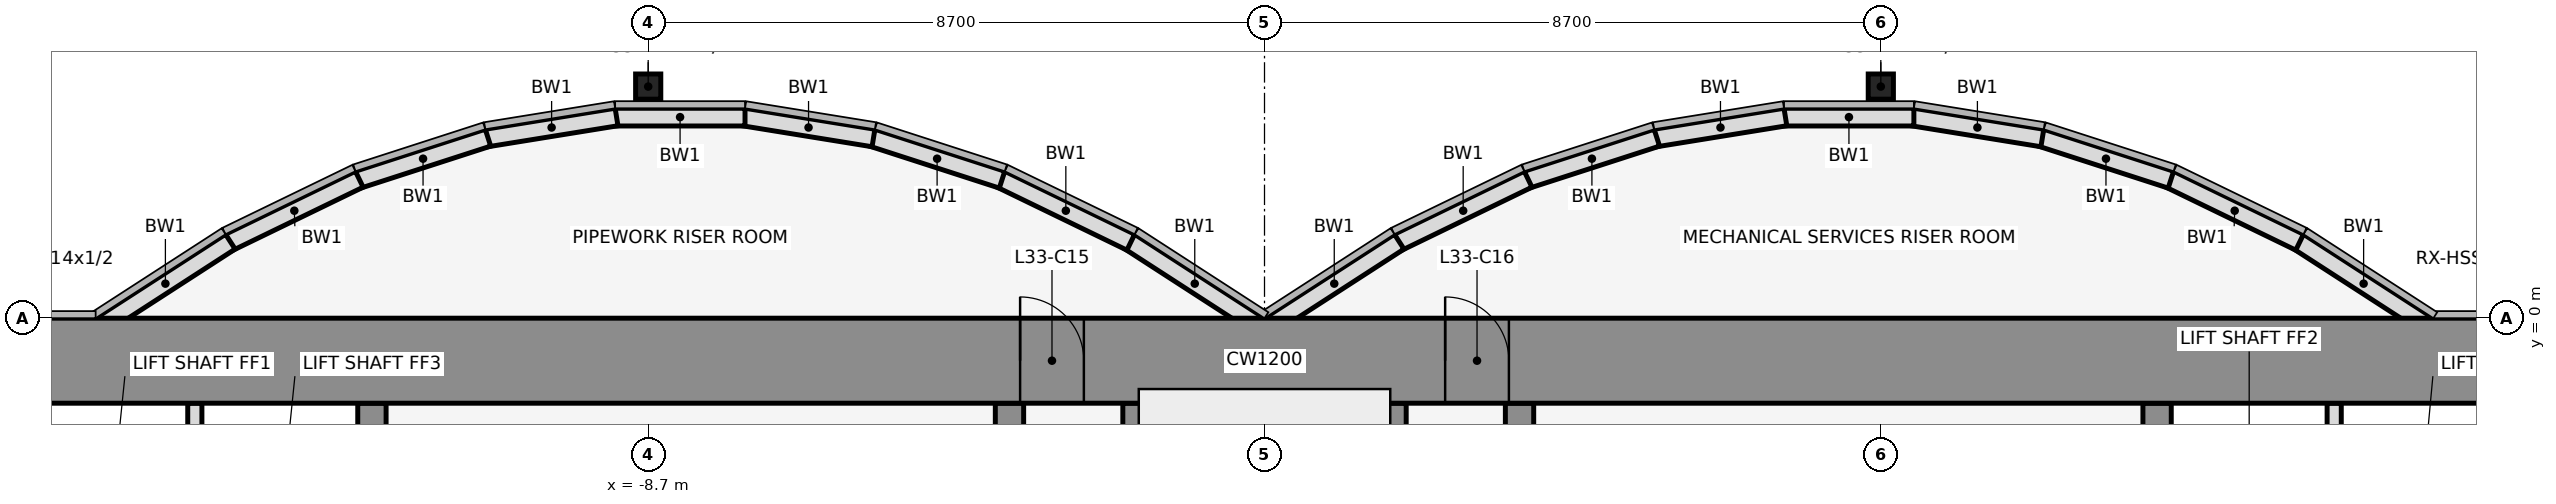
"""IFC4 building model, lengths in metres.
Left out: names, types, materials, properties, quantities, classifications, styles, units other than length and angle.
Written with IfcOpenShell. Run it as: python <this file> out.ifc"""

import sys

from ifc_helpers import new_model, si_unit, direction, frame, frame_2d, origin, origin_2d, place, context, subcontext, project, spatial, rectangle, hollow_rectangle, extrude, element, fill, save


model = new_model("IFC4")
c1 = context("Model", 3, precision=1e-05, world=origin(), true_north=direction((0.0, 1.0)))
c2 = subcontext(c1, "Body", "Model", "MODEL_VIEW")
j1 = project(units=[si_unit("LENGTHUNIT", "METRE"), si_unit("PLANEANGLEUNIT", "RADIAN")], contexts=[c1])
p1 = place(None, origin())
s1 = spatial("IfcSite", under=j1, at=p1, CompositionType="ELEMENT")
p2 = place(p1, origin())
s2 = spatial("IfcBuilding", under=s1, at=p2, CompositionType="ELEMENT")
p3 = place(p2, frame((0.0, 0.0, 152.7)))
s3 = spatial("IfcBuildingStorey", under=s2, at=p3, CompositionType="ELEMENT", Elevation=152.7)
for number, where, z_axis, x_axis in (
    (1, (-8.7, 3.269, 0.0), (0.0, 0.0, 1.0), (1.0, 0.0, 0.0)),
    (2, (8.7, 3.269, 0.0), (0.0, 0.0, 1.0), (1.0, 0.0, 0.0)),
):
    element("IfcColumn", number, at=place(p3, frame(where, z_axis=z_axis, x_axis=x_axis)), inside=s3, PredefinedType="COLUMN", context=c2, shape_type="SweptSolid", body=[
        extrude(hollow_rectangle(XDim=0.356, YDim=0.356, WallThickness=0.012, at=origin_2d()), origin(), (0.0, 0.0, 1.0), 4.1),
    ])
p4 = place(p3, frame((16.432, -0.105, 0.0), z_axis=(0.0, 0.0, 1.0), x_axis=(-0.83981312244, 0.542875602121, 0.0)))
e3 = element("IfcWall", 3, at=p4, inside=s3, PredefinedType="STANDARD", context=c2, shape_type="SweptSolid", body=[
    extrude(rectangle(XDim=2.183, YDim=0.25, at=frame_2d((1.091, 0.0))), origin(), (0.0, 0.0, 1.0), 3.95),
])
p5 = place(p3, frame((14.612, 1.073, 0.0), z_axis=(0.0, 0.0, 1.0), x_axis=(-0.89982408427, 0.436252928206, 0.0)))
e4 = element("IfcWall", 4, at=p5, inside=s3, PredefinedType="STANDARD", context=c2, shape_type="SweptSolid", body=[
    extrude(rectangle(XDim=2.038, YDim=0.25, at=frame_2d((1.019, 0.0))), origin(), (0.0, 0.0, 1.0), 3.95),
])
p6 = place(p3, frame((12.795, 1.955, 0.0), z_axis=(0.0, 0.0, 1.0), x_axis=(-0.951495806175, 0.307661714928, 0.0)))
e5 = element("IfcWall", 5, at=p6, inside=s3, PredefinedType="STANDARD", context=c2, shape_type="SweptSolid", body=[
    extrude(rectangle(XDim=1.927, YDim=0.25, at=frame_2d((0.963, 0.0))), origin(), (0.0, 0.0, 1.0), 3.95),
])
p7 = place(p3, frame((10.98, 2.543, 0.0), z_axis=(0.0, 0.0, 1.0), x_axis=(-0.987181718931, 0.159600293885, 0.0)))
e6 = element("IfcWall", 6, at=p7, inside=s3, PredefinedType="STANDARD", context=c2, shape_type="SweptSolid", body=[
    extrude(rectangle(XDim=1.857, YDim=0.25, at=frame_2d((0.929, 0.0))), origin(), (0.0, 0.0, 1.0), 3.95),
])
p8 = place(p3, frame((9.167, 2.838, 0.0), z_axis=(0.0, 0.0, 1.0), x_axis=(-1.0, 0.0, 0.0)))
e7 = element("IfcWall", 7, at=p8, inside=s3, PredefinedType="STANDARD", context=c2, shape_type="SweptSolid", body=[
    extrude(rectangle(XDim=1.833, YDim=0.25, at=frame_2d((0.917, 0.0))), origin(), (0.0, 0.0, 1.0), 3.95),
])
p9 = place(p3, frame((7.353, 2.84, 0.0), z_axis=(0.0, 0.0, 1.0), x_axis=(-0.987181718931, -0.159600293885, 0.0)))
e8 = element("IfcWall", 8, at=p9, inside=s3, PredefinedType="STANDARD", context=c2, shape_type="SweptSolid", body=[
    extrude(rectangle(XDim=1.857, YDim=0.25, at=frame_2d((0.929, 0.0))), origin(), (0.0, 0.0, 1.0), 3.95),
])
p10 = place(p3, frame((5.538, 2.548, 0.0), z_axis=(0.0, 0.0, 1.0), x_axis=(-0.951495806175, -0.307661714928, 0.0)))
e9 = element("IfcWall", 9, at=p10, inside=s3, PredefinedType="STANDARD", context=c2, shape_type="SweptSolid", body=[
    extrude(rectangle(XDim=1.927, YDim=0.25, at=frame_2d((0.963, 0.0))), origin(), (0.0, 0.0, 1.0), 3.95),
])
p11 = place(p3, frame((3.721, 1.962, 0.0), z_axis=(0.0, 0.0, 1.0), x_axis=(-0.89982408427, -0.436252928206, 0.0)))
e10 = element("IfcWall", 10, at=p11, inside=s3, PredefinedType="STANDARD", context=c2, shape_type="SweptSolid", body=[
    extrude(rectangle(XDim=2.038, YDim=0.25, at=frame_2d((1.019, 0.0))), origin(), (0.0, 0.0, 1.0), 3.95),
])
for number, where, z_axis, x_axis in (
    (11, (1.901, 1.08, 0.0), (0.0, 0.0, 1.0), (-0.84, -0.543, 0.0)),
    (12, (-0.068, -0.105, 0.0), (0.0, 0.0, 1.0), (-0.84, 0.543, 0.0)),
):
    element("IfcWall", number, at=place(p3, frame(where, z_axis=z_axis, x_axis=x_axis)), inside=s3, PredefinedType="STANDARD", context=c2, shape_type="SweptSolid", body=[
        extrude(rectangle(XDim=2.183, YDim=0.25, at=frame_2d((1.091, 0.0))), origin(), (0.0, 0.0, 1.0), 3.95),
    ])
p12 = place(p3, frame((-1.888, 1.073, 0.0), z_axis=(0.0, 0.0, 1.0), x_axis=(-0.89982408427, 0.436252928206, 0.0)))
e13 = element("IfcWall", 13, at=p12, inside=s3, PredefinedType="STANDARD", context=c2, shape_type="SweptSolid", body=[
    extrude(rectangle(XDim=2.038, YDim=0.25, at=frame_2d((1.019, 0.0))), origin(), (0.0, 0.0, 1.0), 3.95),
])
p13 = place(p3, frame((-3.705, 1.955, 0.0), z_axis=(0.0, 0.0, 1.0), x_axis=(-0.951495806175, 0.307661714928, 0.0)))
e14 = element("IfcWall", 14, at=p13, inside=s3, PredefinedType="STANDARD", context=c2, shape_type="SweptSolid", body=[
    extrude(rectangle(XDim=1.927, YDim=0.25, at=frame_2d((0.963, 0.0))), origin(), (0.0, 0.0, 1.0), 3.95),
])
p14 = place(p3, frame((-5.52, 2.543, 0.0), z_axis=(0.0, 0.0, 1.0), x_axis=(-0.987181718931, 0.159600293885, 0.0)))
e15 = element("IfcWall", 15, at=p14, inside=s3, PredefinedType="STANDARD", context=c2, shape_type="SweptSolid", body=[
    extrude(rectangle(XDim=1.857, YDim=0.25, at=frame_2d((0.929, 0.0))), origin(), (0.0, 0.0, 1.0), 3.95),
])
p15 = place(p3, frame((-7.333, 2.838, 0.0), z_axis=(0.0, 0.0, 1.0), x_axis=(-1.0, 0.0, 0.0)))
e16 = element("IfcWall", 16, at=p15, inside=s3, PredefinedType="STANDARD", context=c2, shape_type="SweptSolid", body=[
    extrude(rectangle(XDim=1.833, YDim=0.25, at=frame_2d((0.917, 0.0))), origin(), (0.0, 0.0, 1.0), 3.95),
])
p16 = place(p3, frame((-9.147, 2.84, 0.0), z_axis=(0.0, 0.0, 1.0), x_axis=(-0.987181718931, -0.159600293885, 0.0)))
e17 = element("IfcWall", 17, at=p16, inside=s3, PredefinedType="STANDARD", context=c2, shape_type="SweptSolid", body=[
    extrude(rectangle(XDim=1.857, YDim=0.25, at=frame_2d((0.929, 0.0))), origin(), (0.0, 0.0, 1.0), 3.95),
])
p17 = place(p3, frame((-10.962, 2.548, 0.0), z_axis=(0.0, 0.0, 1.0), x_axis=(-0.951495806175, -0.307661714928, 0.0)))
e18 = element("IfcWall", 18, at=p17, inside=s3, PredefinedType="STANDARD", context=c2, shape_type="SweptSolid", body=[
    extrude(rectangle(XDim=1.927, YDim=0.25, at=frame_2d((0.963, 0.0))), origin(), (0.0, 0.0, 1.0), 3.95),
])
p18 = place(p3, frame((-12.779, 1.962, 0.0), z_axis=(0.0, 0.0, 1.0), x_axis=(-0.89982408427, -0.436252928206, 0.0)))
e19 = element("IfcWall", 19, at=p18, inside=s3, PredefinedType="STANDARD", context=c2, shape_type="SweptSolid", body=[
    extrude(rectangle(XDim=2.038, YDim=0.25, at=frame_2d((1.019, 0.0))), origin(), (0.0, 0.0, 1.0), 3.95),
])
p19 = place(p3, frame((-14.599, 1.08, 0.0), z_axis=(0.0, 0.0, 1.0), x_axis=(-0.83981312244, -0.542875602121, 0.0)))
e20 = element("IfcWall", 20, at=p19, inside=s3, PredefinedType="STANDARD", context=c2, shape_type="SweptSolid", body=[
    extrude(rectangle(XDim=2.183, YDim=0.25, at=frame_2d((1.091, 0.0))), origin(), (0.0, 0.0, 1.0), 3.95),
])
p20 = place(p3, frame((-15.1, -4.6, 0.0), z_axis=(0.0, 0.0, 1.0), x_axis=(0.0, 1.0, 0.0)))
e21 = element("IfcWall", 21, at=p20, inside=s3, PredefinedType="PARTITIONING", context=c2, shape_type="SweptSolid", body=[
    extrude(rectangle(XDim=3.4, YDim=0.2, at=frame_2d((1.7, 0.0))), origin(), (0.0, 0.0, 1.0), 2.84),
])
p21 = place(p3, frame((-12.6, -11.8, 0.0), z_axis=(0.0, 0.0, 1.0), x_axis=(0.0, 1.0, 0.0)))
e22 = element("IfcWall", 22, at=p21, inside=s3, PredefinedType="SHEAR", context=c2, shape_type="SweptSolid", body=[
    extrude(rectangle(XDim=10.6, YDim=0.4, at=frame_2d((5.3, 0.0))), origin(), (0.0, 0.0, 1.0), 4.1),
])
p22 = place(p21, frame((4.75, 0.0, 0.0)))
e23 = element("IfcOpeningElement", 23, at=p22, cuts=e22, PredefinedType="OPENING", context=c2, shape_type="SweptSolid", body=[
    extrude(rectangle(XDim=1.1, YDim=2.1, at=frame_2d((0.55, 1.05))), frame((0.0, 0.212, 0.0), z_axis=(0.0, -1.0, 0.0), x_axis=(1.0, 0.0, 0.0)), (0.0, 0.0, 1.0), 0.424),
])
p23 = place(p3, frame((-3.6, -11.8, 0.0), z_axis=(0.0, 0.0, 1.0), x_axis=(0.0, 1.0, 0.0)))
e24 = element("IfcWall", 24, at=p23, inside=s3, PredefinedType="SHEAR", context=c2, shape_type="SweptSolid", body=[
    extrude(rectangle(XDim=10.6, YDim=0.4, at=frame_2d((5.3, 0.0))), origin(), (0.0, 0.0, 1.0), 4.1),
])
p24 = place(p23, frame((4.85, 0.0, 0.0)))
e25 = element("IfcOpeningElement", 25, at=p24, cuts=e24, PredefinedType="OPENING", context=c2, shape_type="SweptSolid", body=[
    extrude(rectangle(XDim=0.9, YDim=2.1, at=frame_2d((0.45, 1.05))), frame((0.0, 0.212, 0.0), z_axis=(0.0, -1.0, 0.0), x_axis=(1.0, 0.0, 0.0)), (0.0, 0.0, 1.0), 0.424),
])
for number, where, z_axis, x_axis in (
    (26, (-1.8, -11.8, 0.0), (0.0, 0.0, 1.0), (0.0, 1.0, 0.0)),
    (27, (1.8, -11.8, 0.0), (0.0, 0.0, 1.0), (0.0, 1.0, 0.0)),
):
    element("IfcWall", number, at=place(p3, frame(where, z_axis=z_axis, x_axis=x_axis)), inside=s3, PredefinedType="SHEAR", context=c2, shape_type="SweptSolid", body=[
        extrude(rectangle(XDim=10.6, YDim=0.4, at=frame_2d((5.3, 0.0))), origin(), (0.0, 0.0, 1.0), 4.1),
    ])
p25 = place(p3, frame((3.6, -11.8, 0.0), z_axis=(0.0, 0.0, 1.0), x_axis=(0.0, 1.0, 0.0)))
e28 = element("IfcWall", 28, at=p25, inside=s3, PredefinedType="SHEAR", context=c2, shape_type="SweptSolid", body=[
    extrude(rectangle(XDim=10.6, YDim=0.4, at=frame_2d((5.3, 0.0))), origin(), (0.0, 0.0, 1.0), 4.1),
])
p26 = place(p25, frame((1.35, 0.0, 0.0)))
e29 = element("IfcOpeningElement", 29, at=p26, cuts=e28, PredefinedType="OPENING", context=c2, shape_type="SweptSolid", body=[
    extrude(rectangle(XDim=0.9, YDim=2.1, at=frame_2d((0.45, 1.05))), frame((0.0, 0.212, 0.0), z_axis=(0.0, -1.0, 0.0), x_axis=(1.0, 0.0, 0.0)), (0.0, 0.0, 1.0), 0.424),
])
p27 = place(p3, frame((12.6, -11.8, 0.0), z_axis=(0.0, 0.0, 1.0), x_axis=(0.0, 1.0, 0.0)))
e30 = element("IfcWall", 30, at=p27, inside=s3, PredefinedType="SHEAR", context=c2, shape_type="SweptSolid", body=[
    extrude(rectangle(XDim=10.6, YDim=0.4, at=frame_2d((5.3, 0.0))), origin(), (0.0, 0.0, 1.0), 4.1),
])
p28 = place(p27, frame((1.25, 0.0, 0.0)))
e31 = element("IfcOpeningElement", 31, at=p28, cuts=e30, PredefinedType="OPENING", context=c2, shape_type="SweptSolid", body=[
    extrude(rectangle(XDim=1.2, YDim=2.1, at=frame_2d((0.6, 1.05))), frame((0.0, 0.212, 0.0), z_axis=(0.0, -1.0, 0.0), x_axis=(1.0, 0.0, 0.0)), (0.0, 0.0, 1.0), 0.424),
])
p29 = place(p27, frame((4.75, 0.0, 0.0)))
e32 = element("IfcOpeningElement", 32, at=p29, cuts=e30, PredefinedType="OPENING", context=c2, shape_type="SweptSolid", body=[
    extrude(rectangle(XDim=1.1, YDim=2.1, at=frame_2d((0.55, 1.05))), frame((0.0, 0.212, 0.0), z_axis=(0.0, -1.0, 0.0), x_axis=(1.0, 0.0, 0.0)), (0.0, 0.0, 1.0), 0.424),
])
p30 = place(p3, frame((15.1, -4.6, 0.0), z_axis=(0.0, 0.0, 1.0), x_axis=(0.0, 1.0, 0.0)))
e33 = element("IfcWall", 33, at=p30, inside=s3, PredefinedType="PARTITIONING", context=c2, shape_type="SweptSolid", body=[
    extrude(rectangle(XDim=3.4, YDim=0.2, at=frame_2d((1.7, 0.0))), origin(), (0.0, 0.0, 1.0), 2.84),
])
p31 = place(p3, frame((-22.0, -0.6, 0.0), z_axis=(0.0, 0.0, 1.0), x_axis=(1.0, 0.0, 0.0)))
e34 = element("IfcWall", 34, at=p31, inside=s3, PredefinedType="SHEAR", context=c2, shape_type="SweptSolid", body=[
    extrude(rectangle(XDim=44.0, YDim=1.2, at=frame_2d((22.0, 0.0))), origin(), (0.0, 0.0, 1.0), 4.1),
])
p32 = place(p31, frame((18.55, 0.0, 0.0)))
e35 = element("IfcOpeningElement", 35, at=p32, cuts=e34, PredefinedType="OPENING", context=c2, shape_type="SweptSolid", body=[
    extrude(rectangle(XDim=0.9, YDim=2.1, at=frame_2d((0.45, 1.05))), frame((0.0, 0.612, 0.0), z_axis=(0.0, -1.0, 0.0), x_axis=(1.0, 0.0, 0.0)), (0.0, 0.0, 1.0), 1.224),
])
p33 = place(p31, frame((24.55, 0.0, 0.0)))
e36 = element("IfcOpeningElement", 36, at=p33, cuts=e34, PredefinedType="OPENING", context=c2, shape_type="SweptSolid", body=[
    extrude(rectangle(XDim=0.9, YDim=2.1, at=frame_2d((0.45, 1.05))), frame((0.0, 0.612, 0.0), z_axis=(0.0, -1.0, 0.0), x_axis=(1.0, 0.0, 0.0)), (0.0, 0.0, 1.0), 1.224),
])
p34 = place(p32, origin())
e37 = element("IfcDoor", 37, at=p34, inside=s3, OperationType="SINGLE_SWING_LEFT", PredefinedType="DOOR", context=c2, shape_type="SweptSolid", body=[
    extrude(rectangle(XDim=0.9, YDim=2.1, at=frame_2d((0.45, 1.05))), frame((0.0, 0.025, 0.0), z_axis=(0.0, -1.0, 0.0), x_axis=(1.0, 0.0, 0.0)), (0.0, 0.0, 1.0), 0.05),
])
fill(e35, e37)
p35 = place(p33, origin())
e38 = element("IfcDoor", 38, at=p35, inside=s3, OperationType="SINGLE_SWING_LEFT", PredefinedType="DOOR", context=c2, shape_type="SweptSolid", body=[
    extrude(rectangle(XDim=0.9, YDim=2.1, at=frame_2d((0.45, 1.05))), frame((0.0, 0.025, 0.0), z_axis=(0.0, -1.0, 0.0), x_axis=(1.0, 0.0, 0.0)), (0.0, 0.0, 1.0), 0.05),
])
fill(e36, e38)
save(model, sys.argv[1])
